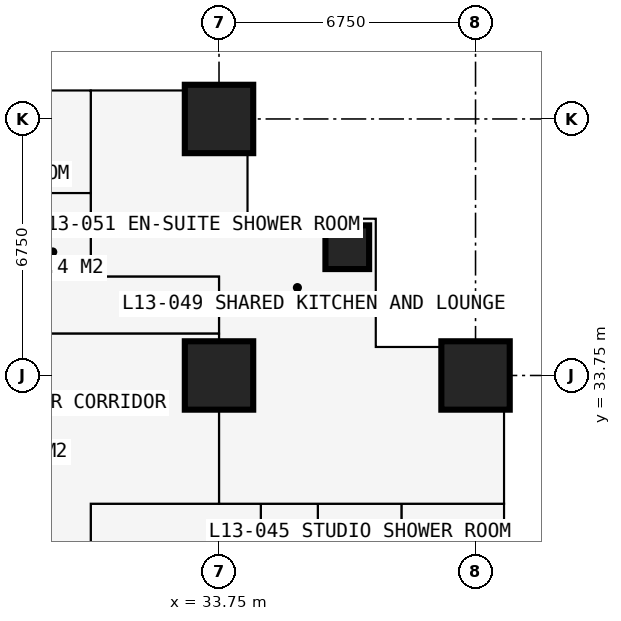
"""IFC4 building model, lengths in metres.
Left out: names, types, materials, properties, quantities, classifications, styles, units other than length and angle.
Written with IfcOpenShell. Run it as: python <this file> out.ifc"""

import sys

from ifc_helpers import new_model, si_unit, direction, frame, frame_2d, origin, origin_2d, place, context, subcontext, project, spatial, rectangle, extrude, element, fill, save


model = new_model("IFC4")
c1 = context("Model", 3, precision=1e-05, world=origin(), true_north=direction((0.0, 1.0)))
c2 = subcontext(c1, "Body", "Model", "MODEL_VIEW")
j1 = project(units=[si_unit("LENGTHUNIT", "METRE"), si_unit("PLANEANGLEUNIT", "RADIAN")], contexts=[c1])
p1 = place(None, origin())
s1 = spatial("IfcSite", under=j1, at=p1, CompositionType="ELEMENT")
p2 = place(p1, origin())
s2 = spatial("IfcBuilding", under=s1, at=p2, CompositionType="ELEMENT")
p3 = place(p2, frame((0.0, 0.0, 50.4)))
s3 = spatial("IfcBuildingStorey", under=s2, at=p3, CompositionType="ELEMENT", Elevation=50.4)
for number, where, z_axis, x_axis in (
    (1, (33.75, 33.75, 0.0), (0.0, 0.0, 1.0), (1.0, 0.0, 0.0)),
    (2, (33.75, 40.5, 0.0), (0.0, 0.0, 1.0), (1.0, 0.0, 0.0)),
):
    element("IfcColumn", number, at=place(p3, frame(where, z_axis=z_axis, x_axis=x_axis)), inside=s3, PredefinedType="COLUMN", context=c2, shape_type="SweptSolid", body=[
        extrude(rectangle(XDim=1.8, YDim=1.8, at=origin_2d()), origin(), (0.0, 0.0, 1.0), 3.6),
    ])
p4 = place(p3, frame((37.125, 37.125, 0.0), z_axis=(0.0, 0.0, 1.0), x_axis=(1.0, 0.0, 0.0)))
e3 = element("IfcColumn", 3, at=p4, inside=s3, PredefinedType="COLUMN", context=c2, shape_type="SweptSolid", body=[
    extrude(rectangle(XDim=1.15, YDim=1.15, at=origin_2d()), origin(), (0.0, 0.0, 1.0), 3.6),
])
p5 = place(p3, frame((40.5, 33.75, 0.0), z_axis=(0.0, 0.0, 1.0), x_axis=(1.0, 0.0, 0.0)))
e4 = element("IfcColumn", 4, at=p5, inside=s3, PredefinedType="COLUMN", context=c2, shape_type="SweptSolid", body=[
    extrude(rectangle(XDim=1.8, YDim=1.8, at=origin_2d()), origin(), (0.0, 0.0, 1.0), 3.6),
])
p6 = place(p3, frame((41.25, 34.5, 0.0), z_axis=(0.0, 0.0, 1.0), x_axis=(-1.0, 0.0, 0.0)))
e5 = element("IfcWall", 5, at=p6, inside=s3, PredefinedType="SOLIDWALL", context=c2, shape_type="SweptSolid", body=[
    extrude(rectangle(XDim=3.375, YDim=0.3, at=frame_2d((1.688, 0.0))), origin(), (0.0, 0.0, 1.0), 3.375),
])
p7 = place(p6, frame((1.833, 0.0, 0.9)))
e6 = element("IfcOpeningElement", 6, at=p7, cuts=e5, PredefinedType="OPENING", context=c2, shape_type="SweptSolid", body=[
    extrude(rectangle(XDim=1.2, YDim=1.8, at=frame_2d((0.6, 0.9))), frame((0.0, 0.16, 0.0), z_axis=(0.0, -1.0, 0.0), x_axis=(1.0, 0.0, 0.0)), (0.0, 0.0, 1.0), 0.32),
])
p8 = place(p3, frame((37.875, 34.5, 0.0), z_axis=(0.0, 0.0, 1.0), x_axis=(0.0, 1.0, 0.0)))
e7 = element("IfcWall", 7, at=p8, inside=s3, PredefinedType="SOLIDWALL", context=c2, shape_type="SweptSolid", body=[
    extrude(rectangle(XDim=3.375, YDim=0.3, at=frame_2d((1.688, 0.0))), origin(), (0.0, 0.0, 1.0), 3.375),
])
p9 = place(p8, frame((0.788, 0.0, 0.6)))
e8 = element("IfcOpeningElement", 8, at=p9, cuts=e7, PredefinedType="OPENING", context=c2, shape_type="SweptSolid", body=[
    extrude(rectangle(XDim=1.8, YDim=2.1, at=frame_2d((0.9, 1.05))), frame((0.0, 0.16, 0.0), z_axis=(0.0, -1.0, 0.0), x_axis=(1.0, 0.0, 0.0)), (0.0, 0.0, 1.0), 0.32),
])
p10 = place(p3, frame((37.875, 37.875, 0.0), z_axis=(0.0, 0.0, 1.0), x_axis=(-1.0, 0.0, 0.0)))
e9 = element("IfcWall", 9, at=p10, inside=s3, PredefinedType="SOLIDWALL", context=c2, shape_type="SweptSolid", body=[
    extrude(rectangle(XDim=3.375, YDim=0.3, at=frame_2d((1.688, 0.0))), origin(), (0.0, 0.0, 1.0), 3.375),
])
p11 = place(p10, frame((0.788, 0.0, 0.6)))
e10 = element("IfcOpeningElement", 10, at=p11, cuts=e9, PredefinedType="OPENING", context=c2, shape_type="SweptSolid", body=[
    extrude(rectangle(XDim=1.8, YDim=2.1, at=frame_2d((0.9, 1.05))), frame((0.0, 0.16, 0.0), z_axis=(0.0, -1.0, 0.0), x_axis=(1.0, 0.0, 0.0)), (0.0, 0.0, 1.0), 0.32),
])
p12 = place(p3, frame((34.5, 37.875, 0.0), z_axis=(0.0, 0.0, 1.0), x_axis=(0.0, 1.0, 0.0)))
e11 = element("IfcWall", 11, at=p12, inside=s3, PredefinedType="SOLIDWALL", context=c2, shape_type="SweptSolid", body=[
    extrude(rectangle(XDim=3.375, YDim=0.3, at=frame_2d((1.688, 0.0))), origin(), (0.0, 0.0, 1.0), 3.375),
])
p13 = place(p12, frame((0.343, 0.0, 0.9)))
e12 = element("IfcOpeningElement", 12, at=p13, cuts=e11, PredefinedType="OPENING", context=c2, shape_type="SweptSolid", body=[
    extrude(rectangle(XDim=1.2, YDim=1.8, at=frame_2d((0.6, 0.9))), frame((0.0, 0.16, 0.0), z_axis=(0.0, -1.0, 0.0), x_axis=(1.0, 0.0, 0.0)), (0.0, 0.0, 1.0), 0.32),
])
p14 = place(p3, frame((10.125, 36.35, 0.0), z_axis=(0.0, 0.0, 1.0), x_axis=(1.0, 0.0, 0.0)))
e13 = element("IfcWall", 13, at=p14, inside=s3, PredefinedType="PARTITIONING", context=c2, shape_type="SweptSolid", body=[
    extrude(rectangle(XDim=23.625, YDim=0.1, at=frame_2d((11.812, 0.0))), origin(), (0.0, 0.0, 1.0), 3.375),
])
p15 = place(p14, frame((21.45, 0.0, 0.0)))
e14 = element("IfcOpeningElement", 14, at=p15, cuts=e13, PredefinedType="OPENING", context=c2, shape_type="SweptSolid", body=[
    extrude(rectangle(XDim=1.0, YDim=2.2, at=frame_2d((0.5, 1.1))), frame((0.0, 0.06, 0.0), z_axis=(0.0, -1.0, 0.0), x_axis=(1.0, 0.0, 0.0)), (0.0, 0.0, 1.0), 0.12),
])
p16 = place(p14, frame((17.125, 0.0, 0.0)))
e15 = element("IfcOpeningElement", 15, at=p16, cuts=e13, PredefinedType="OPENING", context=c2, shape_type="SweptSolid", body=[
    extrude(rectangle(XDim=0.95, YDim=2.2, at=frame_2d((0.475, 1.1))), frame((0.0, 0.06, 0.0), z_axis=(0.0, -1.0, 0.0), x_axis=(1.0, 0.0, 0.0)), (0.0, 0.0, 1.0), 0.12),
])
p17 = place(p14, frame((13.7, 0.0, 0.0)))
e16 = element("IfcOpeningElement", 16, at=p17, cuts=e13, PredefinedType="OPENING", context=c2, shape_type="SweptSolid", body=[
    extrude(rectangle(XDim=0.95, YDim=2.2, at=frame_2d((0.475, 1.1))), frame((0.0, 0.06, 0.0), z_axis=(0.0, -1.0, 0.0), x_axis=(1.0, 0.0, 0.0)), (0.0, 0.0, 1.0), 0.12),
])
p18 = place(p14, frame((0.2, 0.0, 0.0)))
e17 = element("IfcOpeningElement", 17, at=p18, cuts=e13, PredefinedType="OPENING", context=c2, shape_type="SweptSolid", body=[
    extrude(rectangle(XDim=0.95, YDim=2.2, at=frame_2d((0.475, 1.1))), frame((0.0, 0.06, 0.0), z_axis=(0.0, -1.0, 0.0), x_axis=(1.0, 0.0, 0.0)), (0.0, 0.0, 1.0), 0.12),
])
p19 = place(p14, frame((3.625, 0.0, 0.0)))
e18 = element("IfcOpeningElement", 18, at=p19, cuts=e13, PredefinedType="OPENING", context=c2, shape_type="SweptSolid", body=[
    extrude(rectangle(XDim=0.95, YDim=2.2, at=frame_2d((0.475, 1.1))), frame((0.0, 0.06, 0.0), z_axis=(0.0, -1.0, 0.0), x_axis=(1.0, 0.0, 0.0)), (0.0, 0.0, 1.0), 0.12),
])
p20 = place(p14, frame((7.0, 0.0, 0.0)))
e19 = element("IfcOpeningElement", 19, at=p20, cuts=e13, PredefinedType="OPENING", context=c2, shape_type="SweptSolid", body=[
    extrude(rectangle(XDim=0.95, YDim=2.2, at=frame_2d((0.475, 1.1))), frame((0.0, 0.06, 0.0), z_axis=(0.0, -1.0, 0.0), x_axis=(1.0, 0.0, 0.0)), (0.0, 0.0, 1.0), 0.12),
])
p21 = place(p14, frame((10.375, 0.0, 0.0)))
e20 = element("IfcOpeningElement", 20, at=p21, cuts=e13, PredefinedType="OPENING", context=c2, shape_type="SweptSolid", body=[
    extrude(rectangle(XDim=0.95, YDim=2.2, at=frame_2d((0.475, 1.1))), frame((0.0, 0.06, 0.0), z_axis=(0.0, -1.0, 0.0), x_axis=(1.0, 0.0, 0.0)), (0.0, 0.0, 1.0), 0.12),
])
p22 = place(p3, frame((25.725, 34.85, 0.0), z_axis=(0.0, 0.0, 1.0), x_axis=(1.0, 0.0, 0.0)))
e21 = element("IfcWall", 21, at=p22, inside=s3, PredefinedType="PARTITIONING", context=c2, shape_type="SweptSolid", body=[
    extrude(rectangle(XDim=8.025, YDim=0.15, at=frame_2d((4.012, 0.0))), origin(), (0.0, 0.0, 1.0), 3.375),
])
p23 = place(p3, frame((28.375, 38.55, 0.0), z_axis=(0.0, 0.0, 1.0), x_axis=(1.0, 0.0, 0.0)))
e22 = element("IfcWall", 22, at=p23, inside=s3, PredefinedType="PARTITIONING", context=c2, shape_type="SweptSolid", body=[
    extrude(rectangle(XDim=2.0, YDim=0.1, at=frame_2d((1.0, 0.0))), origin(), (0.0, 0.0, 1.0), 3.375),
])
p24 = place(p3, frame((30.375, 29.2, 0.0), z_axis=(0.0, 0.0, 1.0), x_axis=(0.0, 1.0, 0.0)))
e23 = element("IfcWall", 23, at=p24, inside=s3, PredefinedType="PARTITIONING", context=c2, shape_type="SweptSolid", body=[
    extrude(rectangle(XDim=1.175, YDim=0.15, at=frame_2d((0.587, 0.0))), origin(), (0.0, 0.0, 1.0), 3.375),
])
p25 = place(p3, frame((30.375, 30.375, 0.0), z_axis=(0.0, 0.0, 1.0), x_axis=(1.0, 0.0, 0.0)))
e24 = element("IfcWall", 24, at=p25, inside=s3, PredefinedType="PARTITIONING", context=c2, shape_type="SweptSolid", body=[
    extrude(rectangle(XDim=10.859, YDim=0.15, at=frame_2d((5.429, 0.0))), origin(), (0.0, 0.0, 1.0), 3.375),
])
p26 = place(p3, frame((30.375, 36.35, 0.0), z_axis=(0.0, 0.0, 1.0), x_axis=(0.0, 1.0, 0.0)))
e25 = element("IfcWall", 25, at=p26, inside=s3, PredefinedType="PARTITIONING", context=c2, shape_type="SweptSolid", body=[
    extrude(rectangle(XDim=4.884, YDim=0.15, at=frame_2d((2.442, 0.0))), origin(), (0.0, 0.0, 1.0), 3.375),
])
p27 = place(p3, frame((33.75, 30.375, 0.0), z_axis=(0.0, 0.0, 1.0), x_axis=(0.0, 1.0, 0.0)))
e26 = element("IfcWall", 26, at=p27, inside=s3, PredefinedType="PARTITIONING", context=c2, shape_type="SweptSolid", body=[
    extrude(rectangle(XDim=5.975, YDim=0.15, at=frame_2d((2.988, 0.0))), origin(), (0.0, 0.0, 1.0), 2.877),
])
p28 = place(p3, frame((34.85, 12.55, 0.0), z_axis=(0.0, 0.0, 1.0), x_axis=(0.0, 1.0, 0.0)))
e27 = element("IfcWall", 27, at=p28, inside=s3, PredefinedType="PARTITIONING", context=c2, shape_type="SweptSolid", body=[
    extrude(rectangle(XDim=17.825, YDim=0.15, at=frame_2d((8.913, 0.0))), origin(), (0.0, 0.0, 1.0), 3.375),
])
p29 = place(p28, frame((8.6, 0.0, 0.0)))
e28 = element("IfcOpeningElement", 28, at=p29, cuts=e27, PredefinedType="OPENING", context=c2, shape_type="SweptSolid", body=[
    extrude(rectangle(XDim=0.95, YDim=2.2, at=frame_2d((0.475, 1.1))), frame((0.0, 0.085, 0.0), z_axis=(0.0, -1.0, 0.0), x_axis=(1.0, 0.0, 0.0)), (0.0, 0.0, 1.0), 0.17),
])
p30 = place(p3, frame((36.35, 6.75, 0.0), z_axis=(0.0, 0.0, 1.0), x_axis=(0.0, 1.0, 0.0)))
e29 = element("IfcWall", 29, at=p30, inside=s3, PredefinedType="PARTITIONING", context=c2, shape_type="SweptSolid", body=[
    extrude(rectangle(XDim=23.625, YDim=0.1, at=frame_2d((11.812, 0.0))), origin(), (0.0, 0.0, 1.0), 3.375),
])
p31 = place(p30, frame((3.575, 0.0, 0.0)))
e30 = element("IfcOpeningElement", 30, at=p31, cuts=e29, PredefinedType="OPENING", context=c2, shape_type="SweptSolid", body=[
    extrude(rectangle(XDim=0.95, YDim=2.2, at=frame_2d((0.475, 1.1))), frame((0.0, 0.06, 0.0), z_axis=(0.0, -1.0, 0.0), x_axis=(1.0, 0.0, 0.0)), (0.0, 0.0, 1.0), 0.12),
])
p32 = place(p30, frame((7.0, 0.0, 0.0)))
e31 = element("IfcOpeningElement", 31, at=p32, cuts=e29, PredefinedType="OPENING", context=c2, shape_type="SweptSolid", body=[
    extrude(rectangle(XDim=0.95, YDim=2.2, at=frame_2d((0.475, 1.1))), frame((0.0, 0.06, 0.0), z_axis=(0.0, -1.0, 0.0), x_axis=(1.0, 0.0, 0.0)), (0.0, 0.0, 1.0), 0.12),
])
p33 = place(p30, frame((10.375, 0.0, 0.0)))
e32 = element("IfcOpeningElement", 32, at=p33, cuts=e29, PredefinedType="OPENING", context=c2, shape_type="SweptSolid", body=[
    extrude(rectangle(XDim=0.95, YDim=2.2, at=frame_2d((0.475, 1.1))), frame((0.0, 0.06, 0.0), z_axis=(0.0, -1.0, 0.0), x_axis=(1.0, 0.0, 0.0)), (0.0, 0.0, 1.0), 0.12),
])
p34 = place(p30, frame((13.75, 0.0, 0.0)))
e33 = element("IfcOpeningElement", 33, at=p34, cuts=e29, PredefinedType="OPENING", context=c2, shape_type="SweptSolid", body=[
    extrude(rectangle(XDim=0.95, YDim=2.2, at=frame_2d((0.475, 1.1))), frame((0.0, 0.06, 0.0), z_axis=(0.0, -1.0, 0.0), x_axis=(1.0, 0.0, 0.0)), (0.0, 0.0, 1.0), 0.12),
])
p35 = place(p30, frame((17.125, 0.0, 0.0)))
e34 = element("IfcOpeningElement", 34, at=p35, cuts=e29, PredefinedType="OPENING", context=c2, shape_type="SweptSolid", body=[
    extrude(rectangle(XDim=0.95, YDim=2.2, at=frame_2d((0.475, 1.1))), frame((0.0, 0.06, 0.0), z_axis=(0.0, -1.0, 0.0), x_axis=(1.0, 0.0, 0.0)), (0.0, 0.0, 1.0), 0.12),
])
p36 = place(p30, frame((20.5, 0.0, 0.0)))
e35 = element("IfcOpeningElement", 35, at=p36, cuts=e29, PredefinedType="OPENING", context=c2, shape_type="SweptSolid", body=[
    extrude(rectangle(XDim=0.95, YDim=2.2, at=frame_2d((0.475, 1.1))), frame((0.0, 0.06, 0.0), z_axis=(0.0, -1.0, 0.0), x_axis=(1.0, 0.0, 0.0)), (0.0, 0.0, 1.0), 0.12),
])
p37 = place(p3, frame((38.55, 28.375, 0.0), z_axis=(0.0, 0.0, 1.0), x_axis=(0.0, 1.0, 0.0)))
e36 = element("IfcWall", 36, at=p37, inside=s3, PredefinedType="PARTITIONING", context=c2, shape_type="SweptSolid", body=[
    extrude(rectangle(XDim=2.0, YDim=0.1, at=frame_2d((1.0, 0.0))), origin(), (0.0, 0.0, 1.0), 3.375),
])
p38 = place(p7, origin())
e37 = element("IfcWindow", 37, at=p38, inside=s3, PartitioningType="SINGLE_PANEL", PredefinedType="WINDOW", context=c2, shape_type="SweptSolid", body=[
    extrude(rectangle(XDim=1.2, YDim=1.8, at=frame_2d((0.6, 0.9))), frame((0.0, 0.03, 0.0), z_axis=(0.0, -1.0, 0.0), x_axis=(1.0, 0.0, 0.0)), (0.0, 0.0, 1.0), 0.06),
])
fill(e6, e37)
p39 = place(p9, origin())
e38 = element("IfcWindow", 38, at=p39, inside=s3, PartitioningType="SINGLE_PANEL", PredefinedType="WINDOW", context=c2, shape_type="SweptSolid", body=[
    extrude(rectangle(XDim=1.8, YDim=2.1, at=frame_2d((0.9, 1.05))), frame((0.0, 0.03, 0.0), z_axis=(0.0, -1.0, 0.0), x_axis=(1.0, 0.0, 0.0)), (0.0, 0.0, 1.0), 0.06),
])
fill(e8, e38)
p40 = place(p11, origin())
e39 = element("IfcWindow", 39, at=p40, inside=s3, PartitioningType="SINGLE_PANEL", PredefinedType="WINDOW", context=c2, shape_type="SweptSolid", body=[
    extrude(rectangle(XDim=1.8, YDim=2.1, at=frame_2d((0.9, 1.05))), frame((0.0, 0.03, 0.0), z_axis=(0.0, -1.0, 0.0), x_axis=(1.0, 0.0, 0.0)), (0.0, 0.0, 1.0), 0.06),
])
fill(e10, e39)
p41 = place(p13, origin())
e40 = element("IfcWindow", 40, at=p41, inside=s3, PartitioningType="SINGLE_PANEL", PredefinedType="WINDOW", context=c2, shape_type="SweptSolid", body=[
    extrude(rectangle(XDim=1.2, YDim=1.8, at=frame_2d((0.6, 0.9))), frame((0.0, 0.03, 0.0), z_axis=(0.0, -1.0, 0.0), x_axis=(1.0, 0.0, 0.0)), (0.0, 0.0, 1.0), 0.06),
])
fill(e12, e40)
p42 = place(p15, origin())
e41 = element("IfcDoor", 41, at=p42, inside=s3, OperationType="SINGLE_SWING_LEFT", PredefinedType="DOOR", context=c2, shape_type="SweptSolid", body=[
    extrude(rectangle(XDim=1.0, YDim=2.2, at=frame_2d((0.5, 1.1))), frame((0.0, 0.025, 0.0), z_axis=(0.0, -1.0, 0.0), x_axis=(1.0, 0.0, 0.0)), (0.0, 0.0, 1.0), 0.05),
])
fill(e14, e41)
save(model, sys.argv[1])
